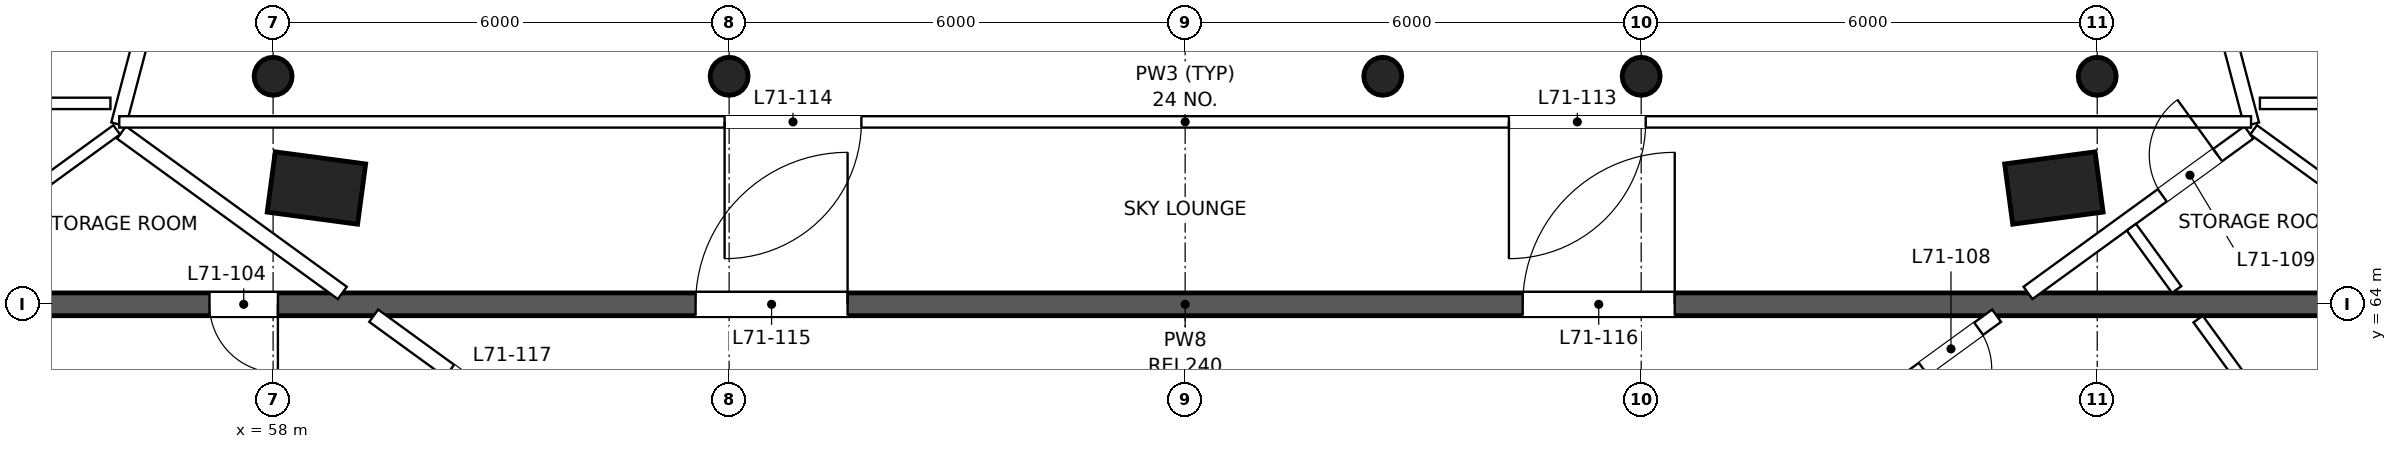
"""IFC4 building model, lengths in metres.
Left out: names, types, materials, properties, quantities, classifications, styles, units other than length and angle.
Written with IfcOpenShell. Run it as: python <this file> out.ifc"""

import sys

from ifc_helpers import new_model, si_unit, direction, frame, frame_2d, origin, origin_2d, place, context, subcontext, project, spatial, rectangle, circle, extrude, element, fill, save


model = new_model("IFC4")
c1 = context("Model", 3, precision=1e-05, world=origin(), true_north=direction((0.0, 1.0)))
c2 = subcontext(c1, "Body", "Model", "MODEL_VIEW")
j1 = project(units=[si_unit("LENGTHUNIT", "METRE"), si_unit("PLANEANGLEUNIT", "RADIAN")], contexts=[c1])
p1 = place(None, origin())
s1 = spatial("IfcSite", under=j1, at=p1, CompositionType="ELEMENT")
p2 = place(p1, origin())
s2 = spatial("IfcBuilding", under=s1, at=p2, CompositionType="ELEMENT")
p3 = place(p2, frame((0.0, 0.0, 300.1)))
s3 = spatial("IfcBuildingStorey", under=s2, at=p3, CompositionType="ELEMENT", Elevation=300.1)
for number, where, z_axis, x_axis in (
    (1, (81.43, 65.53, 0.0), (0.0, 0.0, 1.0), (0.133, -0.991, 0.0)),
    (2, (58.57, 65.53, 0.0), (0.0, 0.0, 1.0), (0.133, 0.991, 0.0)),
):
    element("IfcColumn", number, at=place(p3, frame(where, z_axis=z_axis, x_axis=x_axis)), inside=s3, PredefinedType="COLUMN", context=c2, shape_type="SweptSolid", body=[
        extrude(rectangle(XDim=0.8, YDim=1.2, at=origin_2d()), origin(), (0.0, 0.0, 1.0), 6.0),
    ])
for number, where, z_axis, x_axis in (
    (3, (58.0, 67.0, 0.0), (0.0, 0.0, 1.0), (1.0, 0.0, 0.0)),
    (4, (64.0, 67.0, 0.0), (0.0, 0.0, 1.0), (1.0, 0.0, 0.0)),
    (5, (72.6, 67.0, 0.0), (0.0, 0.0, 1.0), (1.0, 0.0, 0.0)),
    (6, (76.0, 67.0, 0.0), (0.0, 0.0, 1.0), (1.0, 0.0, 0.0)),
    (7, (82.0, 67.0, 0.0), (0.0, 0.0, 1.0), (1.0, 0.0, 0.0)),
):
    element("IfcColumn", number, at=place(p3, frame(where, z_axis=z_axis, x_axis=x_axis)), inside=s3, PredefinedType="COLUMN", context=c2, shape_type="SweptSolid", body=[
        extrude(circle(Radius=0.25, at=origin_2d()), origin(), (0.0, 0.0, 1.0), 6.0),
    ])
p4 = place(p3, frame((48.622, 64.0, 0.0), z_axis=(0.0, 0.0, 1.0), x_axis=(1.0, 0.0, 0.0)))
e8 = element("IfcWall", 8, at=p4, inside=s3, PredefinedType="PARTITIONING", context=c2, shape_type="SweptSolid", body=[
    extrude(rectangle(XDim=42.755, YDim=0.3, at=frame_2d((21.378, 0.0))), origin(), (0.0, 0.0, 1.0), 5.2),
])
p5 = place(p4, frame((8.541, 0.0, 0.0)))
e9 = element("IfcOpeningElement", 9, at=p5, cuts=e8, PredefinedType="OPENING", context=c2, shape_type="SweptSolid", body=[
    extrude(rectangle(XDim=0.9, YDim=2.1, at=frame_2d((0.45, 1.05))), frame((0.0, 0.16, 0.0), z_axis=(0.0, -1.0, 0.0), x_axis=(1.0, 0.0, 0.0)), (0.0, 0.0, 1.0), 0.32),
])
p6 = place(p4, frame((14.936, 0.0, 0.0)))
e10 = element("IfcOpeningElement", 10, at=p6, cuts=e8, PredefinedType="OPENING", context=c2, shape_type="SweptSolid", body=[
    extrude(rectangle(XDim=2.0, YDim=2.1, at=frame_2d((1.0, 1.05))), frame((0.0, 0.16, 0.0), z_axis=(0.0, -1.0, 0.0), x_axis=(1.0, 0.0, 0.0)), (0.0, 0.0, 1.0), 0.32),
])
p7 = place(p4, frame((25.819, 0.0, 0.0)))
e11 = element("IfcOpeningElement", 11, at=p7, cuts=e8, PredefinedType="OPENING", context=c2, shape_type="SweptSolid", body=[
    extrude(rectangle(XDim=2.0, YDim=2.1, at=frame_2d((1.0, 1.05))), frame((0.0, 0.16, 0.0), z_axis=(0.0, -1.0, 0.0), x_axis=(1.0, 0.0, 0.0)), (0.0, 0.0, 1.0), 0.32),
])
p8 = place(p3, frame((83.103, 69.897, 0.0), z_axis=(0.0, 0.0, 1.0), x_axis=(0.254618397002, -0.967041608158, 0.0)))
e12 = element("IfcWall", 12, at=p8, inside=s3, PredefinedType="PARTITIONING", context=c2, shape_type="SweptSolid", body=[
    extrude(rectangle(XDim=3.65, YDim=0.2, at=frame_2d((1.825, 0.0))), origin(), (0.0, 0.0, 1.0), 5.7),
])
p9 = place(p3, frame((83.995, 66.261, 0.0), z_axis=(0.0, 0.0, 1.0), x_axis=(-0.809026987684, -0.587771497437, 0.0)))
e13 = element("IfcWall", 13, at=p9, inside=s3, PredefinedType="PARTITIONING", context=c2, shape_type="SweptSolid", body=[
    extrude(rectangle(XDim=3.592, YDim=0.2, at=frame_2d((1.796, 0.0))), origin(), (0.0, 0.0, 1.0), 5.2),
])
p10 = place(p9, frame((0.507, 0.0, 0.0)))
e14 = element("IfcOpeningElement", 14, at=p10, cuts=e13, PredefinedType="OPENING", context=c2, shape_type="SweptSolid", body=[
    extrude(rectangle(XDim=0.9, YDim=2.1, at=frame_2d((0.45, 1.05))), frame((0.0, 0.11, 0.0), z_axis=(0.0, -1.0, 0.0), x_axis=(1.0, 0.0, 0.0)), (0.0, 0.0, 1.0), 0.22),
])
p11 = place(p3, frame((80.676, 63.85, 0.0), z_axis=(0.0, 0.0, 1.0), x_axis=(-0.809017922832, -0.587783974379, 0.0)))
e15 = element("IfcWall", 15, at=p11, inside=s3, PredefinedType="PARTITIONING", context=c2, shape_type="SweptSolid", body=[
    extrude(rectangle(XDim=3.37, YDim=0.2, at=frame_2d((1.685, 0.0))), origin(), (0.0, 0.0, 1.0), 5.7),
])
p12 = place(p11, frame((0.292, 0.0, 0.0)))
e16 = element("IfcOpeningElement", 16, at=p12, cuts=e15, PredefinedType="OPENING", context=c2, shape_type="SweptSolid", body=[
    extrude(rectangle(XDim=0.9, YDim=2.1, at=frame_2d((0.45, 1.05))), frame((0.0, 0.11, 0.0), z_axis=(0.0, -1.0, 0.0), x_axis=(1.0, 0.0, 0.0)), (0.0, 0.0, 1.0), 0.22),
])
p13 = place(p3, frame((62.05, 61.869, 0.0), z_axis=(0.0, 0.0, 1.0), x_axis=(-0.809017922832, 0.587783974379, 0.0)))
e17 = element("IfcWall", 17, at=p13, inside=s3, PredefinedType="PARTITIONING", context=c2, shape_type="SweptSolid", body=[
    extrude(rectangle(XDim=3.37, YDim=0.2, at=frame_2d((1.685, 0.0))), origin(), (0.0, 0.0, 1.0), 5.7),
])
p14 = place(p13, frame((1.235, 0.0, 0.0)))
e18 = element("IfcOpeningElement", 18, at=p14, cuts=e17, PredefinedType="OPENING", context=c2, shape_type="SweptSolid", body=[
    extrude(rectangle(XDim=0.9, YDim=2.1, at=frame_2d((0.45, 1.05))), frame((0.0, 0.11, 0.0), z_axis=(0.0, -1.0, 0.0), x_axis=(1.0, 0.0, 0.0)), (0.0, 0.0, 1.0), 0.22),
])
p15 = place(p3, frame((58.911, 64.15, 0.0), z_axis=(0.0, 0.0, 1.0), x_axis=(-0.809026987684, 0.587771497437, 0.0)))
e19 = element("IfcWall", 19, at=p15, inside=s3, PredefinedType="PARTITIONING", context=c2, shape_type="SweptSolid", body=[
    extrude(rectangle(XDim=3.592, YDim=0.2, at=frame_2d((1.796, 0.0))), origin(), (0.0, 0.0, 1.0), 5.2),
])
p16 = place(p3, frame((55.967, 66.367, 0.0), z_axis=(0.0, 0.0, 1.0), x_axis=(0.254618397002, 0.967041608158, 0.0)))
e20 = element("IfcWall", 20, at=p16, inside=s3, PredefinedType="PARTITIONING", context=c2, shape_type="SweptSolid", body=[
    extrude(rectangle(XDim=3.65, YDim=0.2, at=frame_2d((1.825, 0.0))), origin(), (0.0, 0.0, 1.0), 5.7),
])
p17 = place(p3, frame((47.763, 66.644, 0.0), z_axis=(0.0, 0.0, 1.0), x_axis=(1.0, 0.0, 0.0)))
e21 = element("IfcWall", 21, at=p17, inside=s3, PredefinedType="PARTITIONING", context=c2, shape_type="SweptSolid", body=[
    extrude(rectangle(XDim=8.096, YDim=0.15, at=frame_2d((4.048, 0.0))), origin(), (0.0, 0.0, 1.0), 5.25),
])
for number, where, z_axis, x_axis in (
    (22, (53.073, 64.211, 0.0), (0.0, 0.0, 1.0), (0.809, 0.588, 0.0)),
    (23, (86.927, 64.211, 0.0), (0.0, 0.0, 1.0), (-0.809, 0.588, 0.0)),
):
    element("IfcWall", number, at=place(p3, frame(where, z_axis=z_axis, x_axis=x_axis)), inside=s3, PredefinedType="PARTITIONING", context=c2, shape_type="SweptSolid", body=[
        extrude(rectangle(XDim=3.547, YDim=0.15, at=frame_2d((1.773, 0.0))), origin(), (0.0, 0.0, 1.0), 5.7),
    ])
p18 = place(p3, frame((92.237, 66.644, 0.0), z_axis=(0.0, 0.0, 1.0), x_axis=(-1.0, 0.0, 0.0)))
e24 = element("IfcWall", 24, at=p18, inside=s3, PredefinedType="PARTITIONING", context=c2, shape_type="SweptSolid", body=[
    extrude(rectangle(XDim=8.096, YDim=0.15, at=frame_2d((4.048, 0.0))), origin(), (0.0, 0.0, 1.0), 5.25),
])
p19 = place(p3, frame((84.531, 62.15, 0.0), z_axis=(0.0, 0.0, 1.0), x_axis=(-0.587774481837, 0.80902481946, 0.0)))
e25 = element("IfcWall", 25, at=p19, inside=s3, PredefinedType="PARTITIONING", context=c2, shape_type="SweptSolid", body=[
    extrude(rectangle(XDim=2.047, YDim=0.15, at=frame_2d((1.023, 0.0))), origin(), (0.0, 0.0, 1.0), 5.7),
])
p20 = place(p3, frame((83.045, 64.194, 0.0), z_axis=(0.0, 0.0, 1.0), x_axis=(-0.587799519818, 0.809006628218, 0.0)))
e26 = element("IfcWall", 26, at=p20, inside=s3, PredefinedType="PARTITIONING", context=c2, shape_type="SweptSolid", body=[
    extrude(rectangle(XDim=1.014, YDim=0.15, at=frame_2d((0.507, 0.0))), origin(), (0.0, 0.0, 1.0), 5.7),
])
p21 = place(p3, frame((84.024, 66.4, 0.0), z_axis=(0.0, 0.0, 1.0), x_axis=(-1.0, 0.0, 0.0)))
e27 = element("IfcWall", 27, at=p21, inside=s3, PredefinedType="PARTITIONING", context=c2, shape_type="SweptSolid", body=[
    extrude(rectangle(XDim=28.048, YDim=0.15, at=frame_2d((14.024, 0.0))), origin(), (0.0, 0.0, 1.0), 5.7),
])
p22 = place(p21, frame((7.965, 0.0, 0.0)))
e28 = element("IfcOpeningElement", 28, at=p22, cuts=e27, PredefinedType="OPENING", context=c2, shape_type="SweptSolid", body=[
    extrude(rectangle(XDim=1.8, YDim=2.1, at=frame_2d((0.9, 1.05))), frame((0.0, 0.085, 0.0), z_axis=(0.0, -1.0, 0.0), x_axis=(1.0, 0.0, 0.0)), (0.0, 0.0, 1.0), 0.17),
])
p23 = place(p21, frame((18.284, 0.0, 0.0)))
e29 = element("IfcOpeningElement", 29, at=p23, cuts=e27, PredefinedType="OPENING", context=c2, shape_type="SweptSolid", body=[
    extrude(rectangle(XDim=1.8, YDim=2.1, at=frame_2d((0.9, 1.05))), frame((0.0, 0.085, 0.0), z_axis=(0.0, -1.0, 0.0), x_axis=(1.0, 0.0, 0.0)), (0.0, 0.0, 1.0), 0.17),
])
p24 = place(p5, frame((0.9, 0.0, 0.0), z_axis=(0.0, 0.0, 1.0), x_axis=(-1.0, 0.0, 0.0)))
e30 = element("IfcDoor", 30, at=p24, inside=s3, OperationType="SINGLE_SWING_LEFT", PredefinedType="DOOR", context=c2, shape_type="SweptSolid", body=[
    extrude(rectangle(XDim=0.9, YDim=2.1, at=frame_2d((0.45, 1.05))), frame((0.0, 0.025, 0.0), z_axis=(0.0, -1.0, 0.0), x_axis=(1.0, 0.0, 0.0)), (0.0, 0.0, 1.0), 0.05),
])
fill(e9, e30)
p25 = place(p12, origin())
e31 = element("IfcDoor", 31, at=p25, inside=s3, OperationType="SINGLE_SWING_RIGHT", PredefinedType="DOOR", context=c2, shape_type="SweptSolid", body=[
    extrude(rectangle(XDim=0.9, YDim=2.1, at=frame_2d((0.45, 1.05))), frame((0.0, 0.025, 0.0), z_axis=(0.0, -1.0, 0.0), x_axis=(1.0, 0.0, 0.0)), (0.0, 0.0, 1.0), 0.05),
])
fill(e16, e31)
p26 = place(p10, frame((0.9, 0.0, 0.0), z_axis=(0.0, 0.0, 1.0), x_axis=(-1.0, 0.0, 0.0)))
e32 = element("IfcDoor", 32, at=p26, inside=s3, OperationType="SINGLE_SWING_RIGHT", PredefinedType="DOOR", context=c2, shape_type="SweptSolid", body=[
    extrude(rectangle(XDim=0.9, YDim=2.1, at=frame_2d((0.45, 1.05))), frame((0.0, 0.025, 0.0), z_axis=(0.0, -1.0, 0.0), x_axis=(1.0, 0.0, 0.0)), (0.0, 0.0, 1.0), 0.05),
])
fill(e14, e32)
p27 = place(p22, origin())
e33 = element("IfcDoor", 33, at=p27, inside=s3, OperationType="DOUBLE_DOOR_SINGLE_SWING", PredefinedType="DOOR", context=c2, shape_type="SweptSolid", body=[
    extrude(rectangle(XDim=1.8, YDim=2.1, at=frame_2d((0.9, 1.05))), frame((0.0, 0.025, 0.0), z_axis=(0.0, -1.0, 0.0), x_axis=(1.0, 0.0, 0.0)), (0.0, 0.0, 1.0), 0.05),
])
fill(e28, e33)
p28 = place(p23, origin())
e34 = element("IfcDoor", 34, at=p28, inside=s3, OperationType="DOUBLE_DOOR_SINGLE_SWING", PredefinedType="DOOR", context=c2, shape_type="SweptSolid", body=[
    extrude(rectangle(XDim=1.8, YDim=2.1, at=frame_2d((0.9, 1.05))), frame((0.0, 0.025, 0.0), z_axis=(0.0, -1.0, 0.0), x_axis=(1.0, 0.0, 0.0)), (0.0, 0.0, 1.0), 0.05),
])
fill(e29, e34)
p29 = place(p6, origin())
e35 = element("IfcDoor", 35, at=p29, inside=s3, OperationType="DOUBLE_DOOR_SINGLE_SWING", PredefinedType="DOOR", context=c2, shape_type="SweptSolid", body=[
    extrude(rectangle(XDim=2.0, YDim=2.1, at=frame_2d((1.0, 1.05))), frame((0.0, 0.025, 0.0), z_axis=(0.0, -1.0, 0.0), x_axis=(1.0, 0.0, 0.0)), (0.0, 0.0, 1.0), 0.05),
])
fill(e10, e35)
p30 = place(p7, origin())
e36 = element("IfcDoor", 36, at=p30, inside=s3, OperationType="DOUBLE_DOOR_SINGLE_SWING", PredefinedType="DOOR", context=c2, shape_type="SweptSolid", body=[
    extrude(rectangle(XDim=2.0, YDim=2.1, at=frame_2d((1.0, 1.05))), frame((0.0, 0.025, 0.0), z_axis=(0.0, -1.0, 0.0), x_axis=(1.0, 0.0, 0.0)), (0.0, 0.0, 1.0), 0.05),
])
fill(e11, e36)
save(model, sys.argv[1])
